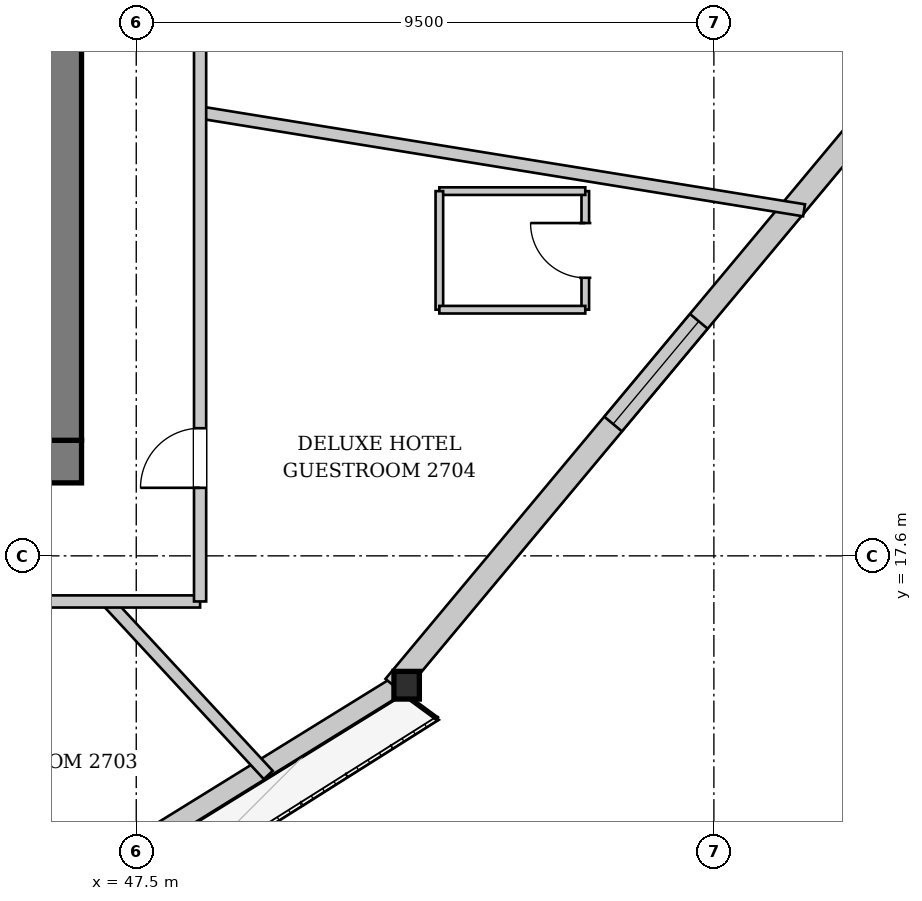
"""IFC4 building model, lengths in metres.
Left out: names, types, materials, properties, quantities, classifications, styles, units other than length and angle.
Written with IfcOpenShell. Run it as: python <this file> out.ifc"""

import sys

from ifc_helpers import new_model, si_unit, direction, frame, frame_2d, origin, origin_2d, place, context, subcontext, project, spatial, rectangle, i_section, extrude, source, transform, mapped, element, fill, save


model = new_model("IFC4")
c1 = context("Model", 3, precision=1e-05, world=origin(), true_north=direction((0.0, 1.0)))
c2 = subcontext(c1, "Body", "Model", "MODEL_VIEW")
j1 = project(units=[si_unit("LENGTHUNIT", "METRE"), si_unit("PLANEANGLEUNIT", "RADIAN")], contexts=[c1])
p1 = place(None, origin())
s1 = spatial("IfcSite", under=j1, at=p1, CompositionType="ELEMENT")
p2 = place(p1, origin())
s2 = spatial("IfcBuilding", under=s1, at=p2, CompositionType="ELEMENT")
p3 = place(p2, frame((0.0, 0.0, 105.7)))
s3 = spatial("IfcBuildingStorey", under=s2, at=p3, CompositionType="ELEMENT", Elevation=105.7)
m1 = source(origin(), c2, "Body", "SweptSolid", [
    extrude(i_section(OverallWidth=0.418, OverallDepth=0.455, WebThickness=0.038, FlangeThickness=0.059, at=origin_2d()), origin(), (0.0, 0.0, 1.0), 3.398),
])
p4 = place(p3, frame((51.891, 15.333, 0.0), z_axis=(0.033119577524, 0.08175722174, 0.996101827264), x_axis=(-0.926838869798, 0.375459331263, 0.0)))
e1 = element("IfcColumn", 1, at=p4, inside=s3, PredefinedType="COLUMN", context=c2, shape_type="MappedRepresentation", body=[
    mapped(m1, transform((0.0, 0.0, 0.0), x_axis=(1.0, 0.0, 0.0), y_axis=(0.0, 1.0, 0.0), z_axis=(0.0, 0.0, 1.0), scale=1.0)),
])
p5 = place(p3, frame((51.807, 15.469, 0.0), z_axis=(0.0, 0.0, 1.0), x_axis=(-0.85050085658, -0.525973661847, 0.0)))
e2 = element("IfcWall", 2, at=p5, inside=s3, PredefinedType="SOLIDWALL", context=c2, shape_type="SweptSolid", body=[
    extrude(rectangle(XDim=23.985, YDim=0.32, at=frame_2d((11.993, 0.0))), origin(), (0.0, 0.0, 1.0), 2.692),
])
p6 = place(p5, frame((7.125, 0.0, 0.0)))
e3 = element("IfcOpeningElement", 3, at=p6, cuts=e2, PredefinedType="OPENING", context=c2, shape_type="SweptSolid", body=[
    extrude(rectangle(XDim=1.1, YDim=2.3, at=frame_2d((0.55, 1.15))), frame((0.0, 0.17, 0.0), z_axis=(0.0, -1.0, 0.0), x_axis=(1.0, 0.0, 0.0)), (0.0, 0.0, 1.0), 0.34),
])
p7 = place(p5, frame((16.849, 0.0, 0.372)))
e4 = element("IfcOpeningElement", 4, at=p7, cuts=e2, PredefinedType="OPENING", context=c2, shape_type="SweptSolid", body=[
    extrude(rectangle(XDim=1.8, YDim=2.2, at=frame_2d((0.9, 1.1))), frame((0.0, 0.17, 0.0), z_axis=(0.0, -1.0, 0.0), x_axis=(1.0, 0.0, 0.0)), (0.0, 0.0, 1.0), 0.34),
])
p8 = place(p3, frame((67.109, 33.873, 0.0), z_axis=(0.0, 0.0, 1.0), x_axis=(-0.640571779822, -0.767898297234, 0.0)))
e5 = element("IfcWall", 5, at=p8, inside=s3, PredefinedType="SOLIDWALL", context=c2, shape_type="SweptSolid", body=[
    extrude(rectangle(XDim=23.985, YDim=0.38, at=frame_2d((11.993, 0.0))), origin(), (0.0, 0.0, 1.0), 2.692),
])
p9 = place(p8, frame((5.616, 0.0, 0.322)))
e6 = element("IfcOpeningElement", 6, at=p9, cuts=e5, PredefinedType="OPENING", context=c2, shape_type="SweptSolid", body=[
    extrude(rectangle(XDim=2.2, YDim=2.25, at=frame_2d((1.1, 1.125))), frame((0.0, 0.2, 0.0), z_axis=(0.0, -1.0, 0.0), x_axis=(1.0, 0.0, 0.0)), (0.0, 0.0, 1.0), 0.4),
])
p10 = place(p8, frame((16.169, 0.0, 0.322)))
e7 = element("IfcOpeningElement", 7, at=p10, cuts=e5, PredefinedType="OPENING", context=c2, shape_type="SweptSolid", body=[
    extrude(rectangle(XDim=2.2, YDim=2.25, at=frame_2d((1.1, 1.125))), frame((0.0, 0.2, 0.0), z_axis=(0.0, -1.0, 0.0), x_axis=(1.0, 0.0, 0.0)), (0.0, 0.0, 1.0), 0.4),
])
p11 = place(p3, frame((46.6, 19.15, 0.0), z_axis=(0.0, 0.0, 1.0), x_axis=(-1.0, 0.0, 0.0)))
e8 = element("IfcWall", 8, at=p11, inside=s3, PredefinedType="SHEAR", context=c2, shape_type="SweptSolid", body=[
    extrude(rectangle(XDim=17.2, YDim=0.7, at=frame_2d((8.6, 0.0))), origin(), (0.0, 0.0, 1.0), 3.3),
])
p12 = place(p11, frame((4.8, 0.0, 0.0)))
e9 = element("IfcOpeningElement", 9, at=p12, cuts=e8, PredefinedType="OPENING", context=c2, shape_type="SweptSolid", body=[
    extrude(rectangle(XDim=1.12, YDim=2.25, at=frame_2d((0.56, 1.125))), frame((0.0, 0.36, 0.0), z_axis=(0.0, -1.0, 0.0), x_axis=(1.0, 0.0, 0.0)), (0.0, 0.0, 1.0), 0.72),
])
p13 = place(p11, frame((11.3, 0.0, 0.0)))
e10 = element("IfcOpeningElement", 10, at=p13, cuts=e8, PredefinedType="OPENING", context=c2, shape_type="SweptSolid", body=[
    extrude(rectangle(XDim=1.12, YDim=2.25, at=frame_2d((0.56, 1.125))), frame((0.0, 0.36, 0.0), z_axis=(0.0, -1.0, 0.0), x_axis=(1.0, 0.0, 0.0)), (0.0, 0.0, 1.0), 0.72),
])
p14 = place(p3, frame((46.25, 33.7, 0.0), z_axis=(0.0, 0.0, 1.0), x_axis=(0.0, -1.0, 0.0)))
e11 = element("IfcWall", 11, at=p14, inside=s3, PredefinedType="SHEAR", context=c2, shape_type="SweptSolid", body=[
    extrude(rectangle(XDim=14.2, YDim=0.7, at=frame_2d((7.1, 0.0))), origin(), (0.0, 0.0, 1.0), 3.3),
])
p15 = place(p14, frame((5.18, 0.0, 0.0)))
e12 = element("IfcOpeningElement", 12, at=p15, cuts=e11, PredefinedType="OPENING", context=c2, shape_type="SweptSolid", body=[
    extrude(rectangle(XDim=1.6, YDim=2.2, at=frame_2d((0.8, 1.1))), frame((0.0, 0.36, 0.0), z_axis=(0.0, -1.0, 0.0), x_axis=(1.0, 0.0, 0.0)), (0.0, 0.0, 1.0), 0.72),
])
p16 = place(p3, frame((47.029, 16.85, 0.0), z_axis=(0.0, 0.0, 1.0), x_axis=(0.679439321048, -0.733731700974, 0.0)))
e13 = element("IfcWall", 13, at=p16, inside=s3, PredefinedType="PARTITIONING", context=c2, shape_type="SweptSolid", body=[
    extrude(rectangle(XDim=3.89, YDim=0.2, at=frame_2d((1.945, 0.0))), origin(), (0.0, 0.0, 1.0), 3.3),
])
p17 = place(p3, frame((48.55, 24.891, 0.0), z_axis=(0.0, 0.0, 1.0), x_axis=(0.987134473354, -0.159892249709, 0.0)))
e14 = element("IfcWall", 14, at=p17, inside=s3, PredefinedType="PARTITIONING", context=c2, shape_type="SweptSolid", body=[
    extrude(rectangle(XDim=10.062, YDim=0.2, at=frame_2d((5.031, 0.0))), origin(), (0.0, 0.0, 1.0), 3.3),
])
p18 = place(p3, frame((54.885, 21.648, 0.0), z_axis=(0.0, 0.0, 1.0), x_axis=(0.0, 1.0, 0.0)))
e15 = element("IfcWall", 15, at=p18, inside=s3, PredefinedType="PARTITIONING", context=c2, shape_type="SweptSolid", body=[
    extrude(rectangle(XDim=1.95, YDim=0.125, at=frame_2d((0.975, 0.0))), origin(), (0.0, 0.0, 1.0), 3.3),
])
p19 = place(p18, frame((0.525, 0.0, 0.0)))
e16 = element("IfcOpeningElement", 16, at=p19, cuts=e15, PredefinedType="OPENING", context=c2, shape_type="SweptSolid", body=[
    extrude(rectangle(XDim=0.9, YDim=2.1, at=frame_2d((0.45, 1.05))), frame((0.0, 0.073, 0.0), z_axis=(0.0, -1.0, 0.0), x_axis=(1.0, 0.0, 0.0)), (0.0, 0.0, 1.0), 0.145),
])
p20 = place(p3, frame((54.885, 23.598, 0.0), z_axis=(0.0, 0.0, 1.0), x_axis=(-1.0, 0.0, 0.0)))
e17 = element("IfcWall", 17, at=p20, inside=s3, PredefinedType="PARTITIONING", context=c2, shape_type="SweptSolid", body=[
    extrude(rectangle(XDim=2.4, YDim=0.125, at=frame_2d((1.2, 0.0))), origin(), (0.0, 0.0, 1.0), 3.3),
])
p21 = place(p3, frame((52.485, 23.598, 0.0), z_axis=(0.0, 0.0, 1.0), x_axis=(0.0, -1.0, 0.0)))
e18 = element("IfcWall", 18, at=p21, inside=s3, PredefinedType="PARTITIONING", context=c2, shape_type="SweptSolid", body=[
    extrude(rectangle(XDim=1.95, YDim=0.125, at=frame_2d((0.975, 0.0))), origin(), (0.0, 0.0, 1.0), 3.3),
])
p22 = place(p3, frame((52.485, 21.648, 0.0), z_axis=(0.0, 0.0, 1.0), x_axis=(1.0, 0.0, 0.0)))
e19 = element("IfcWall", 19, at=p22, inside=s3, PredefinedType="PARTITIONING", context=c2, shape_type="SweptSolid", body=[
    extrude(rectangle(XDim=2.4, YDim=0.125, at=frame_2d((1.2, 0.0))), origin(), (0.0, 0.0, 1.0), 3.3),
])
p23 = place(p3, frame((27.45, 16.85, 0.0), z_axis=(0.0, 0.0, 1.0), x_axis=(1.0, 0.0, 0.0)))
e20 = element("IfcWall", 20, at=p23, inside=s3, PredefinedType="PARTITIONING", context=c2, shape_type="SweptSolid", body=[
    extrude(rectangle(XDim=21.1, YDim=0.2, at=frame_2d((10.55, 0.0))), origin(), (0.0, 0.0, 1.0), 3.045),
])
p24 = place(p23, frame((0.3, 0.0, 0.0)))
e21 = element("IfcOpeningElement", 21, at=p24, cuts=e20, PredefinedType="OPENING", context=c2, shape_type="SweptSolid", body=[
    extrude(rectangle(XDim=0.98, YDim=2.15, at=frame_2d((0.49, 1.075))), frame((0.0, 0.11, 0.0), z_axis=(0.0, -1.0, 0.0), x_axis=(1.0, 0.0, 0.0)), (0.0, 0.0, 1.0), 0.22),
])
p25 = place(p23, frame((6.227, 0.0, 0.0)))
e22 = element("IfcOpeningElement", 22, at=p25, cuts=e20, PredefinedType="OPENING", context=c2, shape_type="SweptSolid", body=[
    extrude(rectangle(XDim=0.98, YDim=2.15, at=frame_2d((0.49, 1.075))), frame((0.0, 0.11, 0.0), z_axis=(0.0, -1.0, 0.0), x_axis=(1.0, 0.0, 0.0)), (0.0, 0.0, 1.0), 0.22),
])
p26 = place(p23, frame((16.55, 0.0, 0.0)))
e23 = element("IfcOpeningElement", 23, at=p26, cuts=e20, PredefinedType="OPENING", context=c2, shape_type="SweptSolid", body=[
    extrude(rectangle(XDim=0.98, YDim=2.15, at=frame_2d((0.49, 1.075))), frame((0.0, 0.11, 0.0), z_axis=(0.0, -1.0, 0.0), x_axis=(1.0, 0.0, 0.0)), (0.0, 0.0, 1.0), 0.22),
])
p27 = place(p3, frame((48.55, 16.85, 0.0), z_axis=(0.0, 0.0, 1.0), x_axis=(0.0, 1.0, 0.0)))
e24 = element("IfcWall", 24, at=p27, inside=s3, PredefinedType="PARTITIONING", context=c2, shape_type="SweptSolid", body=[
    extrude(rectangle(XDim=19.5, YDim=0.2, at=frame_2d((9.75, 0.0))), origin(), (0.0, 0.0, 1.0), 3.3),
])
p28 = place(p27, frame((1.869, 0.0, 0.0)))
e25 = element("IfcOpeningElement", 25, at=p28, cuts=e24, PredefinedType="OPENING", context=c2, shape_type="SweptSolid", body=[
    extrude(rectangle(XDim=0.98, YDim=2.15, at=frame_2d((0.49, 1.075))), frame((0.0, 0.11, 0.0), z_axis=(0.0, -1.0, 0.0), x_axis=(1.0, 0.0, 0.0)), (0.0, 0.0, 1.0), 0.22),
])
p29 = place(p27, frame((11.325, 0.0, 0.0)))
e26 = element("IfcOpeningElement", 26, at=p29, cuts=e24, PredefinedType="OPENING", context=c2, shape_type="SweptSolid", body=[
    extrude(rectangle(XDim=0.98, YDim=2.15, at=frame_2d((0.49, 1.075))), frame((0.0, 0.11, 0.0), z_axis=(0.0, -1.0, 0.0), x_axis=(1.0, 0.0, 0.0)), (0.0, 0.0, 1.0), 0.22),
])
m2 = source(origin(), c2, "Body", "SweptSolid", [
    extrude(rectangle(XDim=2.2, YDim=2.25, at=frame_2d((1.1, 1.125))), frame((0.0, 0.03, 0.0), z_axis=(0.0, -1.0, 0.0), x_axis=(1.0, 0.0, 0.0)), (0.0, 0.0, 1.0), 0.06),
])
p30 = place(p10, origin())
e27 = element("IfcWindow", 27, at=p30, inside=s3, PartitioningType="SINGLE_PANEL", PredefinedType="WINDOW", context=c2, shape_type="MappedRepresentation", body=[
    mapped(m2, transform((0.0, 0.0, 0.0), x_axis=(1.0, 0.0, 0.0), y_axis=(0.0, 1.0, 0.0), z_axis=(0.0, 0.0, 1.0), scale=1.0)),
])
fill(e7, e27)
m3 = source(origin(), c2, "Body", "SweptSolid", [
    extrude(rectangle(XDim=0.9, YDim=2.1, at=frame_2d((0.45, 1.05))), frame((0.0, 0.025, 0.0), z_axis=(0.0, -1.0, 0.0), x_axis=(1.0, 0.0, 0.0)), (0.0, 0.0, 1.0), 0.05),
])
p31 = place(p19, origin())
e28 = element("IfcDoor", 28, at=p31, inside=s3, OperationType="SINGLE_SWING_RIGHT", PredefinedType="DOOR", context=c2, shape_type="MappedRepresentation", body=[
    mapped(m3, transform((0.0, 0.0, 0.0), x_axis=(1.0, 0.0, 0.0), y_axis=(0.0, 1.0, 0.0), z_axis=(0.0, 0.0, 1.0), scale=1.0)),
])
fill(e16, e28)
m4 = source(origin(), c2, "Body", "SweptSolid", [
    extrude(rectangle(XDim=0.98, YDim=2.15, at=frame_2d((0.49, 1.075))), frame((0.0, 0.025, 0.0), z_axis=(0.0, -1.0, 0.0), x_axis=(1.0, 0.0, 0.0)), (0.0, 0.0, 1.0), 0.05),
])
p32 = place(p28, origin())
e29 = element("IfcDoor", 29, at=p32, inside=s3, OperationType="SINGLE_SWING_LEFT", PredefinedType="DOOR", context=c2, shape_type="MappedRepresentation", body=[
    mapped(m4, transform((0.0, 0.0, 0.0), x_axis=(1.0, 0.0, 0.0), y_axis=(0.0, 1.0, 0.0), z_axis=(0.0, 0.0, 1.0), scale=1.0)),
])
fill(e25, e29)
save(model, sys.argv[1])
